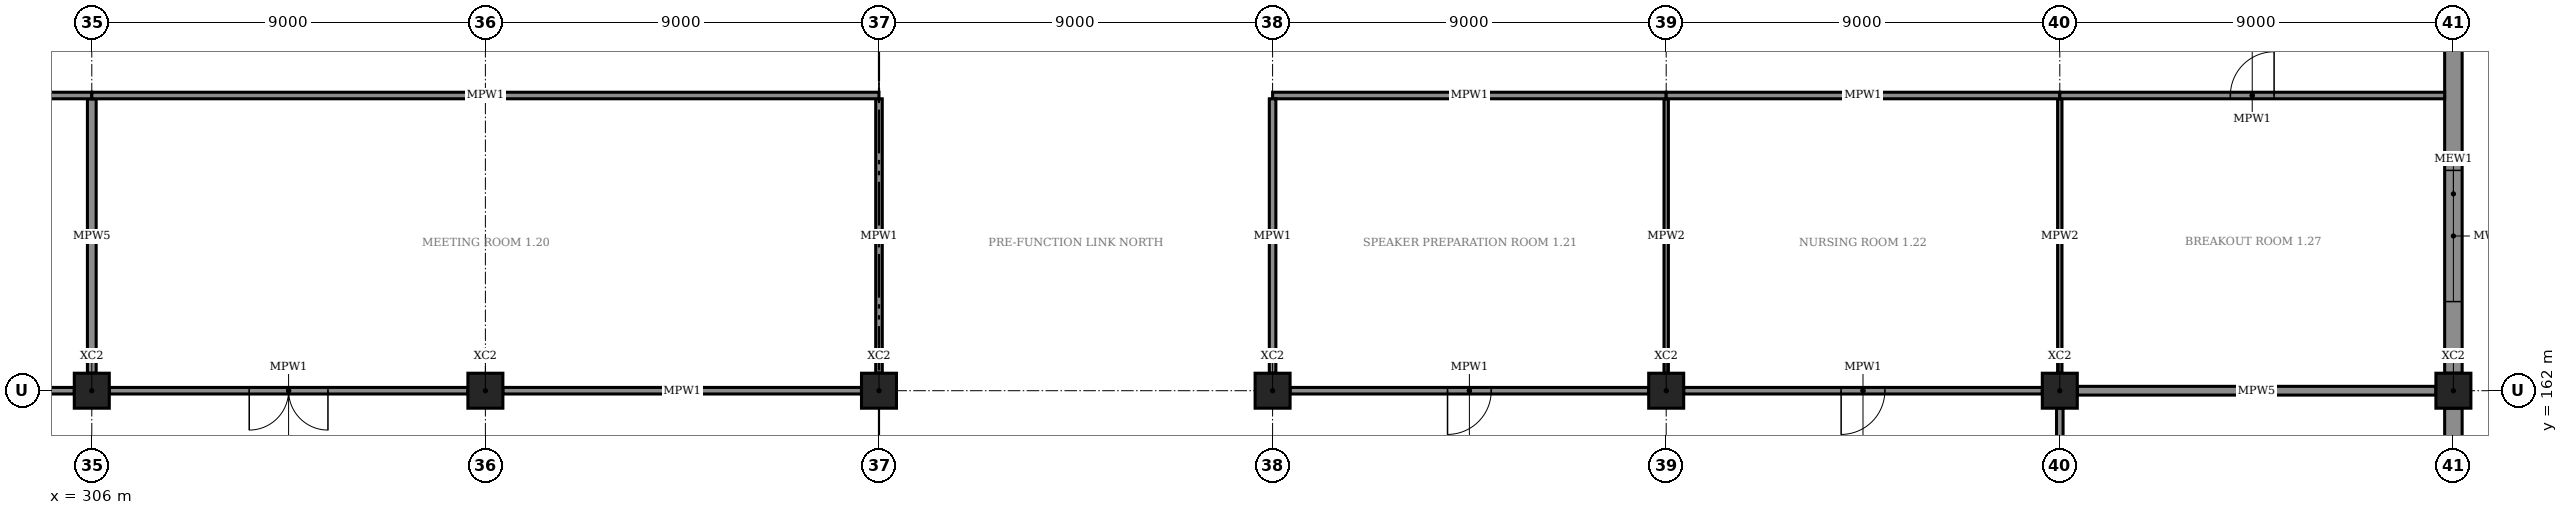
"""IFC4 building model, lengths in metres.
Left out: names, types, materials, properties, quantities, classifications, styles, units other than length and angle.
Written with IfcOpenShell. Run it as: python <this file> out.ifc"""

import sys

from ifc_helpers import new_model, si_unit, direction, frame, frame_2d, origin, origin_2d, place, context, subcontext, project, spatial, rectangle, extrude, element, fill, save


model = new_model("IFC4")
c1 = context("Model", 3, precision=1e-05, world=origin(), true_north=direction((0.0, 1.0)))
c2 = subcontext(c1, "Body", "Model", "MODEL_VIEW")
j1 = project(units=[si_unit("LENGTHUNIT", "METRE"), si_unit("PLANEANGLEUNIT", "RADIAN")], contexts=[c1])
p1 = place(None, origin())
s1 = spatial("IfcSite", under=j1, at=p1, CompositionType="ELEMENT")
p2 = place(p1, origin())
s2 = spatial("IfcBuilding", under=s1, at=p2, CompositionType="ELEMENT")
p3 = place(p2, frame((0.0, 0.0, 6.0)))
s3 = spatial("IfcBuildingStorey", under=s2, at=p3, CompositionType="ELEMENT", Elevation=6.0)
for number, where, z_axis, x_axis in (
    (1, (306.0, 162.0, 0.0), (0.0, 0.0, 1.0), (1.0, 0.0, 0.0)),
    (2, (315.0, 162.0, 0.0), (0.0, 0.0, 1.0), (1.0, 0.0, 0.0)),
    (3, (324.0, 162.0, 0.0), (0.0, 0.0, 1.0), (1.0, 0.0, 0.0)),
    (4, (333.0, 162.0, 0.0), (0.0, 0.0, 1.0), (1.0, 0.0, 0.0)),
    (5, (342.0, 162.0, 0.0), (0.0, 0.0, 1.0), (1.0, 0.0, 0.0)),
    (6, (351.0, 162.0, 0.0), (0.0, 0.0, 1.0), (1.0, 0.0, 0.0)),
    (7, (360.0, 162.0, 0.0), (0.0, 0.0, 1.0), (1.0, 0.0, 0.0)),
):
    element("IfcColumn", number, at=place(p3, frame(where, z_axis=z_axis, x_axis=x_axis)), inside=s3, PredefinedType="COLUMN", context=c2, shape_type="SweptSolid", body=[
        extrude(rectangle(XDim=0.8, YDim=0.8, at=origin_2d()), origin(), (0.0, 0.0, 1.0), 5.5),
    ])
p4 = place(p3, frame((360.0, 153.4, 0.0), z_axis=(0.0, 0.0, 1.0), x_axis=(0.0, 1.0, 0.0)))
e8 = element("IfcWall", 8, at=p4, inside=s3, PredefinedType="STANDARD", context=c2, shape_type="SweptSolid", body=[
    extrude(rectangle(XDim=8.2, YDim=0.4, at=frame_2d((4.1, 0.0))), origin(), (0.0, 0.0, 1.0), 4.32),
])
p5 = place(p4, frame((2.6, 0.0, 0.9)))
e9 = element("IfcOpeningElement", 9, at=p5, cuts=e8, PredefinedType="OPENING", context=c2, shape_type="SweptSolid", body=[
    extrude(rectangle(XDim=3.0, YDim=2.1, at=frame_2d((1.5, 1.05))), frame((0.0, 0.21, 0.0), z_axis=(0.0, -1.0, 0.0), x_axis=(1.0, 0.0, 0.0)), (0.0, 0.0, 1.0), 0.42),
])
p6 = place(p3, frame((360.0, 162.4, 0.0), z_axis=(0.0, 0.0, 1.0), x_axis=(0.0, 1.0, 0.0)))
e10 = element("IfcWall", 10, at=p6, inside=s3, PredefinedType="STANDARD", context=c2, shape_type="SweptSolid", body=[
    extrude(rectangle(XDim=8.2, YDim=0.4, at=frame_2d((4.1, 0.0))), origin(), (0.0, 0.0, 1.0), 4.32),
])
p7 = place(p6, frame((1.638, 0.0, 0.9)))
e11 = element("IfcOpeningElement", 11, at=p7, cuts=e10, PredefinedType="OPENING", context=c2, shape_type="SweptSolid", body=[
    extrude(rectangle(XDim=3.0, YDim=2.1, at=frame_2d((1.5, 1.05))), frame((0.0, 0.21, 0.0), z_axis=(0.0, -1.0, 0.0), x_axis=(1.0, 0.0, 0.0)), (0.0, 0.0, 1.0), 0.42),
])
p8 = place(p3, frame((297.4, 162.0, 0.0), z_axis=(0.0, 0.0, 1.0), x_axis=(1.0, 0.0, 0.0)))
e12 = element("IfcWall", 12, at=p8, inside=s3, PredefinedType="PARTITIONING", context=c2, shape_type="SweptSolid", body=[
    extrude(rectangle(XDim=8.2, YDim=0.15, at=frame_2d((4.1, 0.0))), origin(), (0.0, 0.0, 1.0), 4.32),
])
p9 = place(p8, frame((3.6, 0.0, 0.0)))
e13 = element("IfcOpeningElement", 13, at=p9, cuts=e12, PredefinedType="OPENING", context=c2, shape_type="SweptSolid", body=[
    extrude(rectangle(XDim=1.0, YDim=2.4, at=frame_2d((0.5, 1.2))), frame((0.0, 0.085, 0.0), z_axis=(0.0, -1.0, 0.0), x_axis=(1.0, 0.0, 0.0)), (0.0, 0.0, 1.0), 0.17),
])
p10 = place(p3, frame((297.0, 168.75, 0.0), z_axis=(0.0, 0.0, 1.0), x_axis=(1.0, 0.0, 0.0)))
e14 = element("IfcWall", 14, at=p10, inside=s3, PredefinedType="PARTITIONING", context=c2, shape_type="SweptSolid", body=[
    extrude(rectangle(XDim=9.0, YDim=0.15, at=frame_2d((4.5, 0.0))), origin(), (0.0, 0.0, 1.0), 4.32),
])
p11 = place(p3, frame((306.0, 162.4, 0.0), z_axis=(0.0, 0.0, 1.0), x_axis=(0.0, 1.0, 0.0)))
e15 = element("IfcWall", 15, at=p11, inside=s3, PredefinedType="PARTITIONING", context=c2, shape_type="SweptSolid", body=[
    extrude(rectangle(XDim=6.275, YDim=0.2, at=frame_2d((3.138, 0.0))), origin(), (0.0, 0.0, 1.0), 4.32),
])
p12 = place(p3, frame((306.4, 162.0, 0.0), z_axis=(0.0, 0.0, 1.0), x_axis=(1.0, 0.0, 0.0)))
e16 = element("IfcWall", 16, at=p12, inside=s3, PredefinedType="PARTITIONING", context=c2, shape_type="SweptSolid", body=[
    extrude(rectangle(XDim=8.2, YDim=0.15, at=frame_2d((4.1, 0.0))), origin(), (0.0, 0.0, 1.0), 4.32),
])
p13 = place(p12, frame((3.2, 0.0, 0.0)))
e17 = element("IfcOpeningElement", 17, at=p13, cuts=e16, PredefinedType="OPENING", context=c2, shape_type="SweptSolid", body=[
    extrude(rectangle(XDim=1.8, YDim=2.4, at=frame_2d((0.9, 1.2))), frame((0.0, 0.085, 0.0), z_axis=(0.0, -1.0, 0.0), x_axis=(1.0, 0.0, 0.0)), (0.0, 0.0, 1.0), 0.17),
])
p14 = place(p3, frame((315.4, 162.0, 0.0), z_axis=(0.0, 0.0, 1.0), x_axis=(1.0, 0.0, 0.0)))
e18 = element("IfcWall", 18, at=p14, inside=s3, PredefinedType="PARTITIONING", context=c2, shape_type="SweptSolid", body=[
    extrude(rectangle(XDim=8.2, YDim=0.15, at=frame_2d((4.1, 0.0))), origin(), (0.0, 0.0, 1.0), 4.32),
])
p15 = place(p3, frame((306.0, 168.75, 0.0), z_axis=(0.0, 0.0, 1.0), x_axis=(1.0, 0.0, 0.0)))
e19 = element("IfcWall", 19, at=p15, inside=s3, PredefinedType="PARTITIONING", context=c2, shape_type="SweptSolid", body=[
    extrude(rectangle(XDim=18.0, YDim=0.15, at=frame_2d((9.0, 0.0))), origin(), (0.0, 0.0, 1.0), 4.32),
])
p16 = place(p3, frame((324.0, 162.4, 0.0), z_axis=(0.0, 0.0, 1.0), x_axis=(0.0, 1.0, 0.0)))
e20 = element("IfcWall", 20, at=p16, inside=s3, PredefinedType="PARTITIONING", context=c2, shape_type="SweptSolid", body=[
    extrude(rectangle(XDim=6.275, YDim=0.15, at=frame_2d((3.138, 0.0))), origin(), (0.0, 0.0, 1.0), 4.32),
])
p17 = place(p3, frame((333.4, 162.0, 0.0), z_axis=(0.0, 0.0, 1.0), x_axis=(1.0, 0.0, 0.0)))
e21 = element("IfcWall", 21, at=p17, inside=s3, PredefinedType="PARTITIONING", context=c2, shape_type="SweptSolid", body=[
    extrude(rectangle(XDim=8.2, YDim=0.15, at=frame_2d((4.1, 0.0))), origin(), (0.0, 0.0, 1.0), 4.32),
])
p18 = place(p17, frame((3.6, 0.0, 0.0)))
e22 = element("IfcOpeningElement", 22, at=p18, cuts=e21, PredefinedType="OPENING", context=c2, shape_type="SweptSolid", body=[
    extrude(rectangle(XDim=1.0, YDim=2.4, at=frame_2d((0.5, 1.2))), frame((0.0, 0.085, 0.0), z_axis=(0.0, -1.0, 0.0), x_axis=(1.0, 0.0, 0.0)), (0.0, 0.0, 1.0), 0.17),
])
p19 = place(p3, frame((333.0, 168.75, 0.0), z_axis=(0.0, 0.0, 1.0), x_axis=(1.0, 0.0, 0.0)))
e23 = element("IfcWall", 23, at=p19, inside=s3, PredefinedType="PARTITIONING", context=c2, shape_type="SweptSolid", body=[
    extrude(rectangle(XDim=9.0, YDim=0.15, at=frame_2d((4.5, 0.0))), origin(), (0.0, 0.0, 1.0), 4.32),
])
p20 = place(p3, frame((333.0, 162.4, 0.0), z_axis=(0.0, 0.0, 1.0), x_axis=(0.0, 1.0, 0.0)))
e24 = element("IfcWall", 24, at=p20, inside=s3, PredefinedType="PARTITIONING", context=c2, shape_type="SweptSolid", body=[
    extrude(rectangle(XDim=6.275, YDim=0.15, at=frame_2d((3.138, 0.0))), origin(), (0.0, 0.0, 1.0), 4.32),
])
p21 = place(p3, frame((342.0, 162.4, 0.0), z_axis=(0.0, 0.0, 1.0), x_axis=(0.0, 1.0, 0.0)))
e25 = element("IfcWall", 25, at=p21, inside=s3, PredefinedType="PARTITIONING", context=c2, shape_type="SweptSolid", body=[
    extrude(rectangle(XDim=6.275, YDim=0.1, at=frame_2d((3.138, 0.0))), origin(), (0.0, 0.0, 1.0), 4.32),
])
p22 = place(p3, frame((342.4, 162.0, 0.0), z_axis=(0.0, 0.0, 1.0), x_axis=(1.0, 0.0, 0.0)))
e26 = element("IfcWall", 26, at=p22, inside=s3, PredefinedType="PARTITIONING", context=c2, shape_type="SweptSolid", body=[
    extrude(rectangle(XDim=8.2, YDim=0.15, at=frame_2d((4.1, 0.0))), origin(), (0.0, 0.0, 1.0), 4.32),
])
p23 = place(p22, frame((3.6, 0.0, 0.0)))
e27 = element("IfcOpeningElement", 27, at=p23, cuts=e26, PredefinedType="OPENING", context=c2, shape_type="SweptSolid", body=[
    extrude(rectangle(XDim=1.0, YDim=2.4, at=frame_2d((0.5, 1.2))), frame((0.0, 0.085, 0.0), z_axis=(0.0, -1.0, 0.0), x_axis=(1.0, 0.0, 0.0)), (0.0, 0.0, 1.0), 0.17),
])
p24 = place(p3, frame((342.0, 168.75, 0.0), z_axis=(0.0, 0.0, 1.0), x_axis=(1.0, 0.0, 0.0)))
e28 = element("IfcWall", 28, at=p24, inside=s3, PredefinedType="PARTITIONING", context=c2, shape_type="SweptSolid", body=[
    extrude(rectangle(XDim=9.0, YDim=0.15, at=frame_2d((4.5, 0.0))), origin(), (0.0, 0.0, 1.0), 4.32),
])
p25 = place(p3, frame((351.0, 162.4, 0.0), z_axis=(0.0, 0.0, 1.0), x_axis=(0.0, 1.0, 0.0)))
e29 = element("IfcWall", 29, at=p25, inside=s3, PredefinedType="PARTITIONING", context=c2, shape_type="SweptSolid", body=[
    extrude(rectangle(XDim=6.275, YDim=0.1, at=frame_2d((3.138, 0.0))), origin(), (0.0, 0.0, 1.0), 4.32),
])
p26 = place(p3, frame((351.4, 162.0, 0.0), z_axis=(0.0, 0.0, 1.0), x_axis=(1.0, 0.0, 0.0)))
e30 = element("IfcWall", 30, at=p26, inside=s3, PredefinedType="PARTITIONING", context=c2, shape_type="SweptSolid", body=[
    extrude(rectangle(XDim=8.2, YDim=0.2, at=frame_2d((4.1, 0.0))), origin(), (0.0, 0.0, 1.0), 4.32),
])
p27 = place(p3, frame((351.0, 153.4, 0.0), z_axis=(0.0, 0.0, 1.0), x_axis=(0.0, 1.0, 0.0)))
e31 = element("IfcWall", 31, at=p27, inside=s3, PredefinedType="PARTITIONING", context=c2, shape_type="SweptSolid", body=[
    extrude(rectangle(XDim=8.2, YDim=0.15, at=frame_2d((4.1, 0.0))), origin(), (0.0, 0.0, 1.0), 4.32),
])
p28 = place(p3, frame((351.0, 168.75, 0.0), z_axis=(0.0, 0.0, 1.0), x_axis=(1.0, 0.0, 0.0)))
e32 = element("IfcWall", 32, at=p28, inside=s3, PredefinedType="PARTITIONING", context=c2, shape_type="SweptSolid", body=[
    extrude(rectangle(XDim=8.8, YDim=0.15, at=frame_2d((4.4, 0.0))), origin(), (0.0, 0.0, 1.0), 4.32),
])
p29 = place(p28, frame((3.9, 0.0, 0.0)))
e33 = element("IfcOpeningElement", 33, at=p29, cuts=e32, PredefinedType="OPENING", context=c2, shape_type="SweptSolid", body=[
    extrude(rectangle(XDim=1.0, YDim=2.4, at=frame_2d((0.5, 1.2))), frame((0.0, 0.085, 0.0), z_axis=(0.0, -1.0, 0.0), x_axis=(1.0, 0.0, 0.0)), (0.0, 0.0, 1.0), 0.17),
])
p30 = place(p7, origin())
e34 = element("IfcWindow", 34, at=p30, inside=s3, PartitioningType="TRIPLE_PANEL_VERTICAL", PredefinedType="WINDOW", context=c2, shape_type="SweptSolid", body=[
    extrude(rectangle(XDim=3.0, YDim=2.1, at=frame_2d((1.5, 1.05))), frame((0.0, 0.03, 0.0), z_axis=(0.0, -1.0, 0.0), x_axis=(1.0, 0.0, 0.0)), (0.0, 0.0, 1.0), 0.06),
])
fill(e11, e34)
p31 = place(p13, frame((1.8, 0.0, 0.0), z_axis=(0.0, 0.0, 1.0), x_axis=(-1.0, 0.0, 0.0)))
e35 = element("IfcDoor", 35, at=p31, inside=s3, OperationType="DOUBLE_DOOR_SINGLE_SWING", PredefinedType="DOOR", context=c2, shape_type="SweptSolid", body=[
    extrude(rectangle(XDim=1.8, YDim=2.4, at=frame_2d((0.9, 1.2))), frame((0.0, 0.025, 0.0), z_axis=(0.0, -1.0, 0.0), x_axis=(1.0, 0.0, 0.0)), (0.0, 0.0, 1.0), 0.05),
])
fill(e17, e35)
p32 = place(p18, frame((1.0, 0.0, 0.0), z_axis=(0.0, 0.0, 1.0), x_axis=(-1.0, 0.0, 0.0)))
e36 = element("IfcDoor", 36, at=p32, inside=s3, OperationType="SINGLE_SWING_LEFT", PredefinedType="DOOR", context=c2, shape_type="SweptSolid", body=[
    extrude(rectangle(XDim=1.0, YDim=2.4, at=frame_2d((0.5, 1.2))), frame((0.0, 0.025, 0.0), z_axis=(0.0, -1.0, 0.0), x_axis=(1.0, 0.0, 0.0)), (0.0, 0.0, 1.0), 0.05),
])
fill(e22, e36)
p33 = place(p23, frame((1.0, 0.0, 0.0), z_axis=(0.0, 0.0, 1.0), x_axis=(-1.0, 0.0, 0.0)))
e37 = element("IfcDoor", 37, at=p33, inside=s3, OperationType="SINGLE_SWING_LEFT", PredefinedType="DOOR", context=c2, shape_type="SweptSolid", body=[
    extrude(rectangle(XDim=1.0, YDim=2.4, at=frame_2d((0.5, 1.2))), frame((0.0, 0.025, 0.0), z_axis=(0.0, -1.0, 0.0), x_axis=(1.0, 0.0, 0.0)), (0.0, 0.0, 1.0), 0.05),
])
fill(e27, e37)
p34 = place(p29, origin())
e38 = element("IfcDoor", 38, at=p34, inside=s3, OperationType="SINGLE_SWING_RIGHT", PredefinedType="DOOR", context=c2, shape_type="SweptSolid", body=[
    extrude(rectangle(XDim=1.0, YDim=2.4, at=frame_2d((0.5, 1.2))), frame((0.0, 0.025, 0.0), z_axis=(0.0, -1.0, 0.0), x_axis=(1.0, 0.0, 0.0)), (0.0, 0.0, 1.0), 0.05),
])
fill(e33, e38)
save(model, sys.argv[1])
